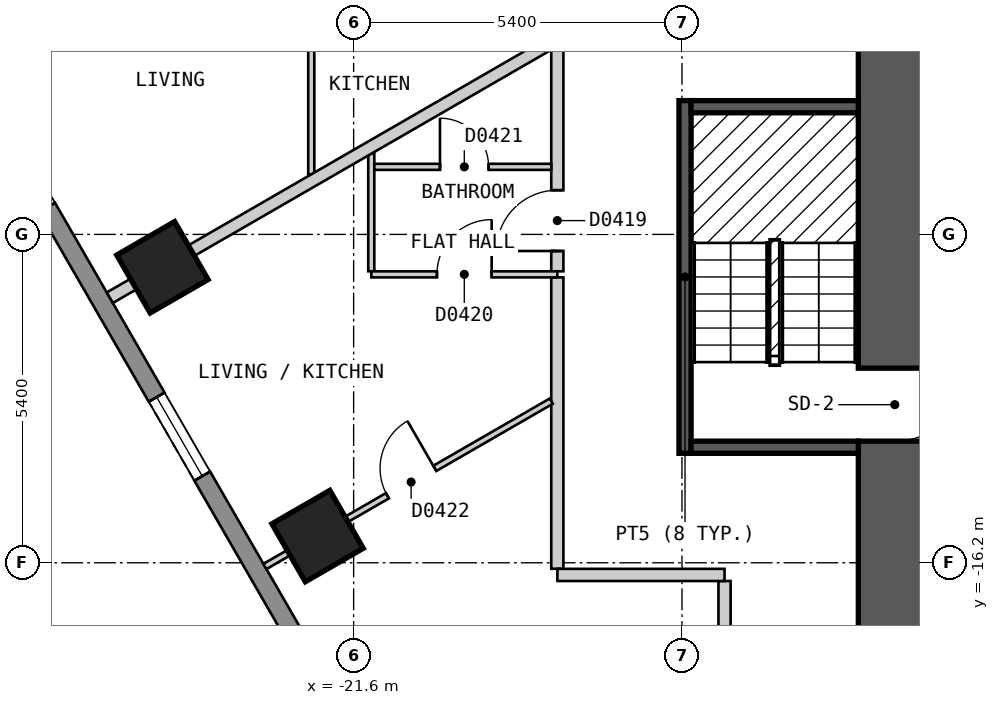
"""IFC4 building model, lengths in metres.
Left out: names, types, materials, properties, quantities, classifications, styles, units other than length and angle.
Written with IfcOpenShell. Run it as: python <this file> out.ifc"""

import sys

from ifc_helpers import new_model, si_unit, direction, frame, frame_2d, origin, origin_2d, place, context, subcontext, project, spatial, polyline, rectangle, outline, extrude, element, fill, save


model = new_model("IFC4")
c1 = context("Model", 3, precision=1e-05, world=origin(), true_north=direction((0.0, 1.0)))
c2 = subcontext(c1, "Body", "Model", "MODEL_VIEW")
j1 = project(units=[si_unit("LENGTHUNIT", "METRE"), si_unit("PLANEANGLEUNIT", "RADIAN")], contexts=[c1])
p1 = place(None, origin())
s1 = spatial("IfcSite", under=j1, at=p1, CompositionType="ELEMENT")
p2 = place(p1, origin())
s2 = spatial("IfcBuilding", under=s1, at=p2, CompositionType="ELEMENT")
p3 = place(p2, frame((0.0, 0.0, 26.4)))
s3 = spatial("IfcBuildingStorey", under=s2, at=p3, CompositionType="ELEMENT", Elevation=26.4)
for number, where, z_axis, x_axis in (
    (1, (-24.745, -11.341, 0.0), (0.0, 0.0, 1.0), (0.5, -0.866, 0.0)),
    (2, (-22.193, -15.761, 0.0), (0.0, 0.0, 1.0), (0.5, -0.866, 0.0)),
):
    element("IfcColumn", number, at=place(p3, frame(where, z_axis=z_axis, x_axis=x_axis)), inside=s3, PredefinedType="COLUMN", context=c2, shape_type="SweptSolid", body=[
        extrude(rectangle(XDim=1.1, YDim=1.1, at=origin_2d()), origin(), (0.0, 0.0, 1.0), 3.0),
    ])
p4 = place(p3, frame((-12.7, -17.8, 0.0), z_axis=(0.0, 0.0, 1.0), x_axis=(0.0, 1.0, 0.0)))
e3 = element("IfcWall", 3, at=p4, inside=s3, PredefinedType="SHEAR", context=c2, shape_type="SweptSolid", body=[
    extrude(rectangle(XDim=11.6, YDim=1.2, at=frame_2d((5.8, 0.0))), origin(), (0.0, 0.0, 1.0), 2.7),
])
p5 = place(p4, frame((3.6, 0.0, 0.0)))
e4 = element("IfcOpeningElement", 4, at=p5, cuts=e3, PredefinedType="OPENING", context=c2, shape_type="SweptSolid", body=[
    extrude(rectangle(XDim=1.2, YDim=2.1, at=frame_2d((0.6, 1.05))), frame((0.0, 0.61, 0.0), z_axis=(0.0, -1.0, 0.0), x_axis=(1.0, 0.0, 0.0)), (0.0, 0.0, 1.0), 1.22),
])
p6 = place(p3, frame((-31.22, -2.425, 0.0), z_axis=(0.0, 0.0, 1.0), x_axis=(0.500001938803, -0.866024284413, 0.0)))
e5 = element("IfcWall", 5, at=p6, inside=s3, PredefinedType="SOLIDWALL", context=c2, shape_type="SweptSolid", body=[
    extrude(outline(polyline([(0.0, -0.15), (27.02, -0.15), (26.94, 0.15), (0.08, 0.15), (0.0, -0.15)])), origin(), (0.0, 0.0, 1.0), 2.7),
])
p7 = place(p6, frame((2.553, 0.0, 0.15)))
e6 = element("IfcOpeningElement", 6, at=p7, cuts=e5, PredefinedType="OPENING", context=c2, shape_type="SweptSolid", body=[
    extrude(rectangle(XDim=1.5, YDim=2.1, at=frame_2d((0.75, 1.05))), frame((0.0, 0.16, 0.0), z_axis=(0.0, -1.0, 0.0), x_axis=(1.0, 0.0, 0.0)), (0.0, 0.0, 1.0), 0.32),
])
p8 = place(p6, frame((7.657, 0.0, 0.15)))
e7 = element("IfcOpeningElement", 7, at=p8, cuts=e5, PredefinedType="OPENING", context=c2, shape_type="SweptSolid", body=[
    extrude(rectangle(XDim=1.5, YDim=2.1, at=frame_2d((0.75, 1.05))), frame((0.0, 0.16, 0.0), z_axis=(0.0, -1.0, 0.0), x_axis=(1.0, 0.0, 0.0)), (0.0, 0.0, 1.0), 0.32),
])
p9 = place(p6, frame((12.761, 0.0, 0.15)))
e8 = element("IfcOpeningElement", 8, at=p9, cuts=e5, PredefinedType="OPENING", context=c2, shape_type="SweptSolid", body=[
    extrude(rectangle(XDim=1.5, YDim=2.1, at=frame_2d((0.75, 1.05))), frame((0.0, 0.16, 0.0), z_axis=(0.0, -1.0, 0.0), x_axis=(1.0, 0.0, 0.0)), (0.0, 0.0, 1.0), 0.32),
])
p10 = place(p6, frame((17.865, 0.0, 0.15)))
e9 = element("IfcOpeningElement", 9, at=p10, cuts=e5, PredefinedType="OPENING", context=c2, shape_type="SweptSolid", body=[
    extrude(rectangle(XDim=1.5, YDim=2.1, at=frame_2d((0.75, 1.05))), frame((0.0, 0.16, 0.0), z_axis=(0.0, -1.0, 0.0), x_axis=(1.0, 0.0, 0.0)), (0.0, 0.0, 1.0), 0.32),
])
p11 = place(p6, frame((22.969, 0.0, 0.15)))
e10 = element("IfcOpeningElement", 10, at=p11, cuts=e5, PredefinedType="OPENING", context=c2, shape_type="SweptSolid", body=[
    extrude(rectangle(XDim=1.5, YDim=2.1, at=frame_2d((0.75, 1.05))), frame((0.0, 0.16, 0.0), z_axis=(0.0, -1.0, 0.0), x_axis=(1.0, 0.0, 0.0)), (0.0, 0.0, 1.0), 0.32),
])
p12 = place(p3, frame((-15.5, -16.5, 0.0), z_axis=(0.0, 0.0, 1.0), x_axis=(0.0, -1.0, 0.0)))
e11 = element("IfcWall", 11, at=p12, inside=s3, PredefinedType="PARTITIONING", context=c2, shape_type="SweptSolid", body=[
    extrude(rectangle(XDim=4.599, YDim=0.2, at=frame_2d((2.3, 0.0))), origin(), (0.0, 0.0, 1.0), 2.7),
])
p13 = place(p3, frame((-18.25, -11.507, 0.0), z_axis=(0.0, 0.0, 1.0), x_axis=(0.0, -1.0, 0.0)))
e12 = element("IfcWall", 12, at=p13, inside=s3, PredefinedType="PARTITIONING", context=c2, shape_type="SweptSolid", body=[
    extrude(rectangle(XDim=4.792, YDim=0.2, at=frame_2d((2.396, 0.0))), origin(), (0.0, 0.0, 1.0), 2.7),
])
p14 = place(p3, frame((-18.249, -16.4, 0.0), z_axis=(0.0, 0.0, 1.0), x_axis=(1.0, 0.0, 0.0)))
e13 = element("IfcWall", 13, at=p14, inside=s3, PredefinedType="PARTITIONING", context=c2, shape_type="SweptSolid", body=[
    extrude(rectangle(XDim=2.749, YDim=0.2, at=frame_2d((1.375, 0.0))), origin(), (0.0, 0.0, 1.0), 2.7),
])
p15 = place(p3, frame((-18.25, -11.407, 0.0), z_axis=(0.0, 0.0, 1.0), x_axis=(0.0, 1.0, 0.0)))
e14 = element("IfcWall", 14, at=p15, inside=s3, PredefinedType="PARTITIONING", context=c2, shape_type="SweptSolid", body=[
    extrude(rectangle(XDim=3.665, YDim=0.2, at=frame_2d((1.833, 0.0))), origin(), (0.0, 0.0, 1.0), 2.7),
])
p16 = place(p15, frame((0.334, 0.0, 0.0)))
e15 = element("IfcOpeningElement", 15, at=p16, cuts=e14, PredefinedType="OPENING", context=c2, shape_type="SweptSolid", body=[
    extrude(rectangle(XDim=1.0, YDim=2.1, at=frame_2d((0.5, 1.05))), frame((0.0, 0.11, 0.0), z_axis=(0.0, -1.0, 0.0), x_axis=(1.0, 0.0, 0.0)), (0.0, 0.0, 1.0), 0.22),
])
p17 = place(p3, frame((-21.31, -9.474, 0.0), z_axis=(0.0, 0.0, 1.0), x_axis=(0.0, -1.0, 0.0)))
e16 = element("IfcWall", 16, at=p17, inside=s3, PredefinedType="PARTITIONING", context=c2, shape_type="SweptSolid", body=[
    extrude(rectangle(XDim=1.932, YDim=0.1, at=frame_2d((0.966, 0.0))), origin(), (0.0, 0.0, 1.0), 2.7),
])
p18 = place(p3, frame((-21.26, -9.689, 0.0), z_axis=(0.0, 0.0, 1.0), x_axis=(1.0, 0.0, 0.0)))
e17 = element("IfcWall", 17, at=p18, inside=s3, PredefinedType="PARTITIONING", context=c2, shape_type="SweptSolid", body=[
    extrude(rectangle(XDim=2.91, YDim=0.1, at=frame_2d((1.455, 0.0))), origin(), (0.0, 0.0, 1.0), 2.7),
])
p19 = place(p18, frame((1.08, 0.0, 0.0)))
e18 = element("IfcOpeningElement", 18, at=p19, cuts=e17, PredefinedType="OPENING", context=c2, shape_type="SweptSolid", body=[
    extrude(rectangle(XDim=0.8, YDim=2.1, at=frame_2d((0.4, 1.05))), frame((0.0, 0.06, 0.0), z_axis=(0.0, -1.0, 0.0), x_axis=(1.0, 0.0, 0.0)), (0.0, 0.0, 1.0), 0.12),
])
p20 = place(p3, frame((-21.309, -11.457, 0.0), z_axis=(0.0, 0.0, 1.0), x_axis=(1.0, 0.0, 0.0)))
e19 = element("IfcWall", 19, at=p20, inside=s3, PredefinedType="PARTITIONING", context=c2, shape_type="SweptSolid", body=[
    extrude(rectangle(XDim=3.059, YDim=0.1, at=frame_2d((1.53, 0.0))), origin(), (0.0, 0.0, 1.0), 2.7),
])
p21 = place(p20, frame((1.079, 0.0, 0.0)))
e20 = element("IfcOpeningElement", 20, at=p21, cuts=e19, PredefinedType="OPENING", context=c2, shape_type="SweptSolid", body=[
    extrude(rectangle(XDim=0.9, YDim=2.1, at=frame_2d((0.45, 1.05))), frame((0.0, 0.06, 0.0), z_axis=(0.0, -1.0, 0.0), x_axis=(1.0, 0.0, 0.0)), (0.0, 0.0, 1.0), 0.12),
])
p22 = place(p3, frame((-22.297, -9.813, 0.0), z_axis=(0.0, 0.0, 1.0), x_axis=(0.0, 1.0, 0.0)))
e21 = element("IfcWall", 21, at=p22, inside=s3, PredefinedType="PARTITIONING", context=c2, shape_type="SweptSolid", body=[
    extrude(rectangle(XDim=4.338, YDim=0.1, at=frame_2d((2.169, 0.0))), origin(), (0.0, 0.0, 1.0), 2.7),
])
p23 = place(p22, frame((2.818, 0.0, 0.0)))
e22 = element("IfcOpeningElement", 22, at=p23, cuts=e21, PredefinedType="OPENING", context=c2, shape_type="SweptSolid", body=[
    extrude(rectangle(XDim=0.9, YDim=2.1, at=frame_2d((0.45, 1.05))), frame((0.0, 0.06, 0.0), z_axis=(0.0, -1.0, 0.0), x_axis=(1.0, 0.0, 0.0)), (0.0, 0.0, 1.0), 0.12),
])
p24 = place(p3, frame((-23.059, -16.261, 0.0), z_axis=(0.0, 0.0, 1.0), x_axis=(0.866004639177, 0.500035963631, 0.0)))
e23 = element("IfcWall", 23, at=p24, inside=s3, PredefinedType="PARTITIONING", context=c2, shape_type="SweptSolid", body=[
    extrude(rectangle(XDim=5.438, YDim=0.1, at=frame_2d((2.719, 0.0))), origin(), (0.0, 0.0, 1.0), 2.7),
])
p25 = place(p24, frame((2.326, 0.0, 0.0)))
e24 = element("IfcOpeningElement", 24, at=p25, cuts=e23, PredefinedType="OPENING", context=c2, shape_type="SweptSolid", body=[
    extrude(rectangle(XDim=0.9, YDim=2.1, at=frame_2d((0.45, 1.05))), frame((0.0, 0.06, 0.0), z_axis=(0.0, -1.0, 0.0), x_axis=(1.0, 0.0, 0.0)), (0.0, 0.0, 1.0), 0.12),
])
p26 = place(p3, frame((-25.61, -11.841, 0.0), z_axis=(0.0, 0.0, 1.0), x_axis=(0.866019023803, 0.500011050288, 0.0)))
e25 = element("IfcWall", 25, at=p26, inside=s3, PredefinedType="PARTITIONING", context=c2, shape_type="SweptSolid", body=[
    extrude(rectangle(XDim=8.47, YDim=0.2, at=frame_2d((4.235, 0.0))), origin(), (0.0, 0.0, 1.0), 2.7),
])
p27 = place(p3, frame((-16.15, -14.4, 0.0), z_axis=(0.0, 0.0, 1.0), x_axis=(0.0, 1.0, 0.0)))
e26 = element("IfcWall", 26, at=p27, inside=s3, PredefinedType="SOLIDWALL", context=c2, shape_type="SweptSolid", body=[
    extrude(rectangle(XDim=5.8, YDim=0.2, at=frame_2d((2.9, 0.0))), origin(), (0.0, 0.0, 1.0), 2.7),
])
for number, where, z_axis, x_axis in (
    (27, (-16.05, -14.3, 0.0), (0.0, 0.0, 1.0), (1.0, 0.0, 0.0)),
    (28, (-16.05, -8.7, 0.0), (0.0, 0.0, 1.0), (1.0, 0.0, 0.0)),
):
    element("IfcWall", number, at=place(p3, frame(where, z_axis=z_axis, x_axis=x_axis)), inside=s3, PredefinedType="SOLIDWALL", context=c2, shape_type="SweptSolid", body=[
        extrude(rectangle(XDim=2.75, YDim=0.2, at=frame_2d((1.375, 0.0))), origin(), (0.0, 0.0, 1.0), 2.7),
    ])
p28 = place(p9, origin())
e29 = element("IfcWindow", 29, at=p28, inside=s3, PartitioningType="SINGLE_PANEL", PredefinedType="WINDOW", context=c2, shape_type="SweptSolid", body=[
    extrude(rectangle(XDim=1.5, YDim=2.1, at=frame_2d((0.75, 1.05))), frame((0.0, 0.03, 0.0), z_axis=(0.0, -1.0, 0.0), x_axis=(1.0, 0.0, 0.0)), (0.0, 0.0, 1.0), 0.06),
])
fill(e8, e29)
p29 = place(p16, origin())
e30 = element("IfcDoor", 30, at=p29, inside=s3, OperationType="SINGLE_SWING_LEFT", PredefinedType="DOOR", context=c2, shape_type="SweptSolid", body=[
    extrude(rectangle(XDim=1.0, YDim=2.1, at=frame_2d((0.5, 1.05))), frame((0.0, 0.025, 0.0), z_axis=(0.0, -1.0, 0.0), x_axis=(1.0, 0.0, 0.0)), (0.0, 0.0, 1.0), 0.05),
])
fill(e15, e30)
p30 = place(p21, origin())
e31 = element("IfcDoor", 31, at=p30, inside=s3, OperationType="SINGLE_SWING_RIGHT", PredefinedType="DOOR", context=c2, shape_type="SweptSolid", body=[
    extrude(rectangle(XDim=0.9, YDim=2.1, at=frame_2d((0.45, 1.05))), frame((0.0, 0.025, 0.0), z_axis=(0.0, -1.0, 0.0), x_axis=(1.0, 0.0, 0.0)), (0.0, 0.0, 1.0), 0.05),
])
fill(e20, e31)
p31 = place(p19, origin())
e32 = element("IfcDoor", 32, at=p31, inside=s3, OperationType="SINGLE_SWING_LEFT", PredefinedType="DOOR", context=c2, shape_type="SweptSolid", body=[
    extrude(rectangle(XDim=0.8, YDim=2.1, at=frame_2d((0.4, 1.05))), frame((0.0, 0.025, 0.0), z_axis=(0.0, -1.0, 0.0), x_axis=(1.0, 0.0, 0.0)), (0.0, 0.0, 1.0), 0.05),
])
fill(e18, e32)
p32 = place(p25, origin())
e33 = element("IfcDoor", 33, at=p32, inside=s3, OperationType="SINGLE_SWING_RIGHT", PredefinedType="DOOR", context=c2, shape_type="SweptSolid", body=[
    extrude(rectangle(XDim=0.9, YDim=2.1, at=frame_2d((0.45, 1.05))), frame((0.0, 0.025, 0.0), z_axis=(0.0, -1.0, 0.0), x_axis=(1.0, 0.0, 0.0)), (0.0, 0.0, 1.0), 0.05),
])
fill(e24, e33)
p33 = place(p5, origin())
e34 = element("IfcDoor", 34, at=p33, inside=s3, OperationType="SINGLE_SWING_RIGHT", PredefinedType="DOOR", context=c2, shape_type="SweptSolid", body=[
    extrude(rectangle(XDim=1.2, YDim=2.1, at=frame_2d((0.6, 1.05))), frame((0.0, 0.025, 0.0), z_axis=(0.0, -1.0, 0.0), x_axis=(1.0, 0.0, 0.0)), (0.0, 0.0, 1.0), 0.05),
])
fill(e4, e34)
save(model, sys.argv[1])
